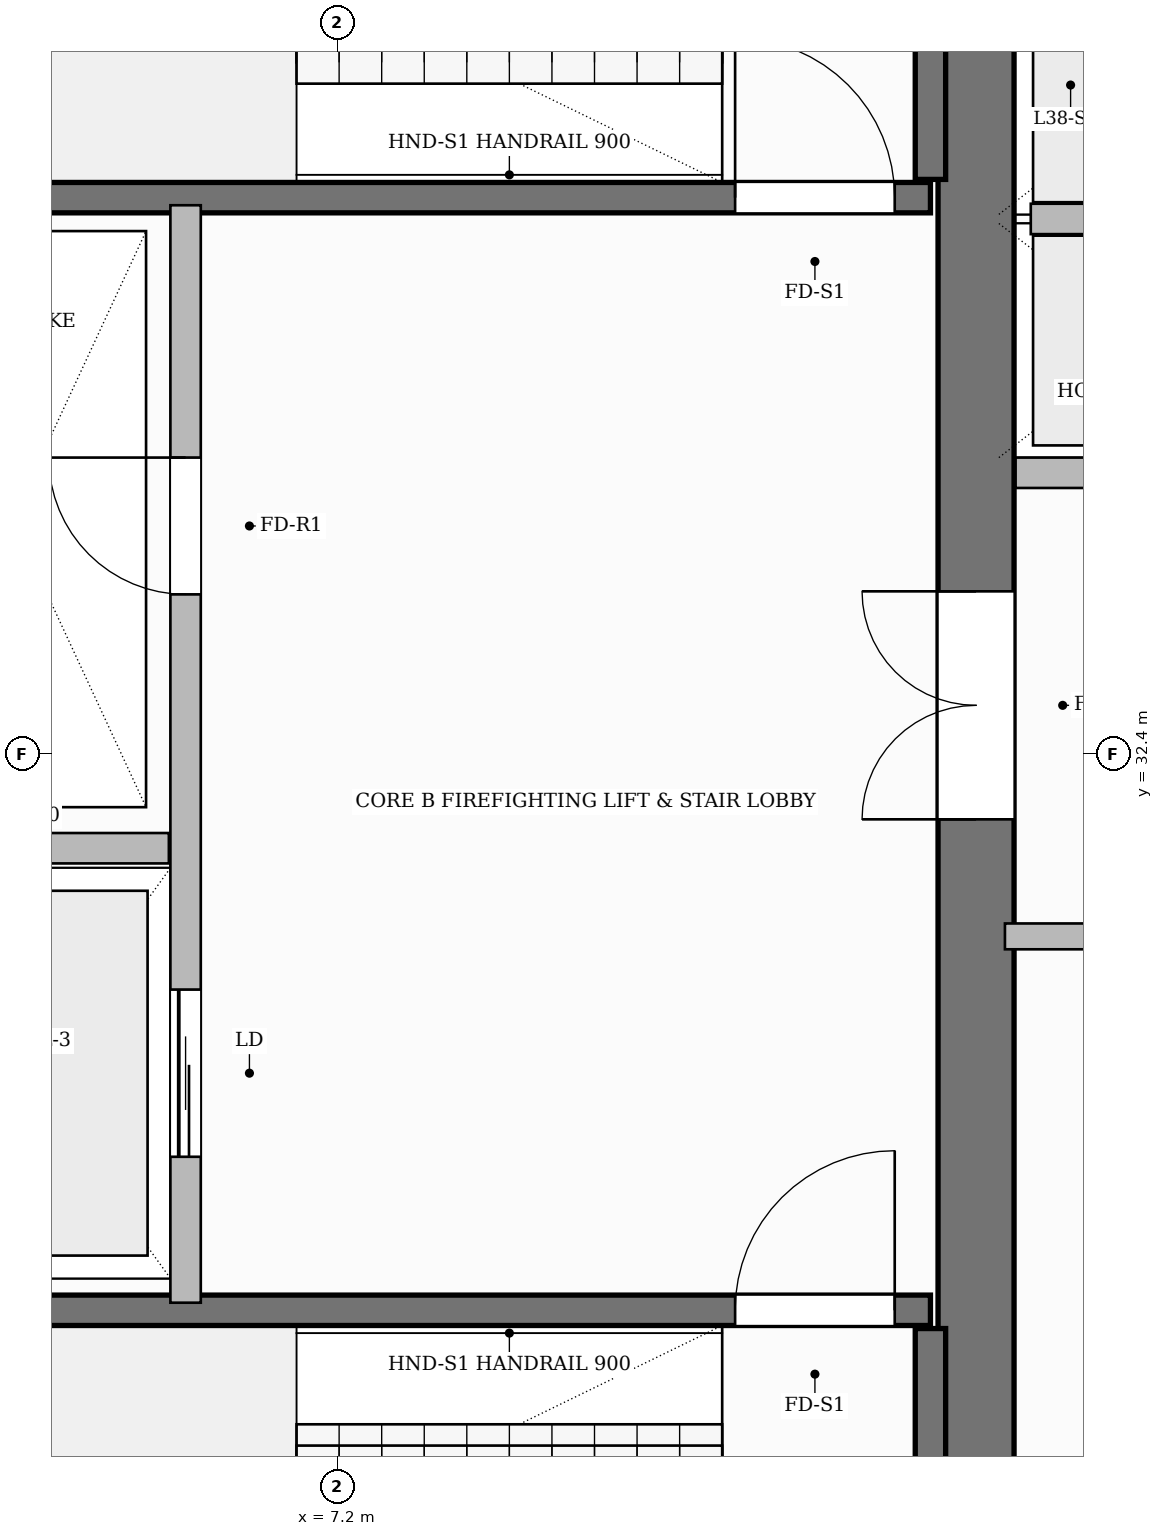
"""IFC4 building model, lengths in metres.
Left out: names, types, materials, properties, quantities, classifications, styles, units other than length and angle.
Written with IfcOpenShell. Run it as: python <this file> out.ifc"""

import sys

from ifc_helpers import new_model, si_unit, direction, frame, frame_2d, origin, place, context, subcontext, project, spatial, rectangle, extrude, source, transform, mapped, element, fill, save


model = new_model("IFC4")
c1 = context("Model", 3, precision=1e-05, world=origin(), true_north=direction((0.0, 1.0)))
c2 = subcontext(c1, "Body", "Model", "MODEL_VIEW")
j1 = project(units=[si_unit("LENGTHUNIT", "METRE"), si_unit("PLANEANGLEUNIT", "RADIAN")], contexts=[c1])
p1 = place(None, origin())
s1 = spatial("IfcSite", under=j1, at=p1, CompositionType="ELEMENT")
p2 = place(p1, origin())
s2 = spatial("IfcBuilding", under=s1, at=p2, CompositionType="ELEMENT")
p3 = place(p2, frame((0.0, 0.0, 111.8)))
s3 = spatial("IfcBuildingStorey", under=s2, at=p3, CompositionType="ELEMENT", Elevation=111.8)
p4 = place(p3, frame((11.4, 25.475, 0.0), z_axis=(0.0, 0.0, 1.0), x_axis=(0.0, 1.0, 0.0)))
e1 = element("IfcWall", 1, at=p4, inside=s3, PredefinedType="SHEAR", context=c2, shape_type="SweptSolid", body=[
    extrude(rectangle(XDim=13.85, YDim=0.55, at=frame_2d((6.925, 0.0))), origin(), (0.0, 0.0, 1.0), 3.7),
])
p5 = place(p4, frame((6.495, 0.0, 0.0)))
e2 = element("IfcOpeningElement", 2, at=p5, cuts=e1, PredefinedType="OPENING", context=c2, shape_type="SweptSolid", body=[
    extrude(rectangle(XDim=1.5, YDim=2.2, at=frame_2d((0.75, 1.1))), frame((0.0, 0.285, 0.0), z_axis=(0.0, -1.0, 0.0), x_axis=(1.0, 0.0, 0.0)), (0.0, 0.0, 1.0), 0.57),
])
p6 = place(p3, frame((11.1, 25.92, 0.0), z_axis=(0.0, 0.0, 1.0), x_axis=(0.0, 1.0, 0.0)))
e3 = element("IfcWall", 3, at=p6, inside=s3, PredefinedType="SHEAR", context=c2, shape_type="SweptSolid", body=[
    extrude(rectangle(XDim=2.7, YDim=0.2, at=frame_2d((1.35, 0.0))), origin(), (0.0, 0.0, 1.0), 3.7),
])
p7 = place(p3, frame((4.0, 28.74, 0.0), z_axis=(0.0, 0.0, 1.0), x_axis=(1.0, 0.0, 0.0)))
e4 = element("IfcWall", 4, at=p7, inside=s3, PredefinedType="SHEAR", context=c2, shape_type="SweptSolid", body=[
    extrude(rectangle(XDim=7.1, YDim=0.2, at=frame_2d((3.55, 0.0))), origin(), (0.0, 0.0, 1.0), 3.7),
])
p8 = place(p7, frame((5.815, 0.0, 0.0)))
e5 = element("IfcOpeningElement", 5, at=p8, cuts=e4, PredefinedType="OPENING", context=c2, shape_type="SweptSolid", body=[
    extrude(rectangle(XDim=1.05, YDim=2.2, at=frame_2d((0.525, 1.1))), frame((0.0, 0.11, 0.0), z_axis=(0.0, -1.0, 0.0), x_axis=(1.0, 0.0, 0.0)), (0.0, 0.0, 1.0), 0.22),
])
p9 = place(p3, frame((11.1, 36.18, 0.0), z_axis=(0.0, 0.0, 1.0), x_axis=(0.0, 1.0, 0.0)))
e6 = element("IfcWall", 6, at=p9, inside=s3, PredefinedType="SHEAR", context=c2, shape_type="SweptSolid", body=[
    extrude(rectangle(XDim=2.7, YDim=0.2, at=frame_2d((1.35, 0.0))), origin(), (0.0, 0.0, 1.0), 3.7),
])
p10 = place(p3, frame((4.0, 36.06, 0.0), z_axis=(0.0, 0.0, 1.0), x_axis=(1.0, 0.0, 0.0)))
e7 = element("IfcWall", 7, at=p10, inside=s3, PredefinedType="SHEAR", context=c2, shape_type="SweptSolid", body=[
    extrude(rectangle(XDim=7.1, YDim=0.2, at=frame_2d((3.55, 0.0))), origin(), (0.0, 0.0, 1.0), 3.7),
])
p11 = place(p10, frame((5.815, 0.0, 0.0)))
e8 = element("IfcOpeningElement", 8, at=p11, cuts=e7, PredefinedType="OPENING", context=c2, shape_type="SweptSolid", body=[
    extrude(rectangle(XDim=1.05, YDim=2.2, at=frame_2d((0.525, 1.1))), frame((0.0, 0.11, 0.0), z_axis=(0.0, -1.0, 0.0), x_axis=(1.0, 0.0, 0.0)), (0.0, 0.0, 1.0), 0.22),
])
p12 = place(p3, frame((6.2, 28.79, 0.0), z_axis=(0.0, 0.0, 1.0), x_axis=(0.0, 1.0, 0.0)))
e9 = element("IfcWall", 9, at=p12, inside=s3, PredefinedType="PARTITIONING", context=c2, shape_type="SweptSolid", body=[
    extrude(rectangle(XDim=7.22, YDim=0.2, at=frame_2d((3.61, 0.0))), origin(), (0.0, 0.0, 1.0), 3.45),
])
p13 = place(p12, frame((4.66, 0.0, 0.0)))
e10 = element("IfcOpeningElement", 10, at=p13, cuts=e9, PredefinedType="OPENING", context=c2, shape_type="SweptSolid", body=[
    extrude(rectangle(XDim=0.9, YDim=2.1, at=frame_2d((0.45, 1.05))), frame((0.0, 0.11, 0.0), z_axis=(0.0, -1.0, 0.0), x_axis=(1.0, 0.0, 0.0)), (0.0, 0.0, 1.0), 0.22),
])
p14 = place(p12, frame((0.96, 0.0, 0.0)))
e11 = element("IfcOpeningElement", 11, at=p14, cuts=e9, PredefinedType="OPENING", context=c2, shape_type="SweptSolid", body=[
    extrude(rectangle(XDim=1.1, YDim=2.2, at=frame_2d((0.55, 1.1))), frame((0.0, 0.11, 0.0), z_axis=(0.0, -1.0, 0.0), x_axis=(1.0, 0.0, 0.0)), (0.0, 0.0, 1.0), 0.22),
])
p15 = place(p3, frame((3.96, 31.78, 0.0), z_axis=(0.0, 0.0, 1.0), x_axis=(1.0, 0.0, 0.0)))
e12 = element("IfcWall", 12, at=p15, inside=s3, PredefinedType="PARTITIONING", context=c2, shape_type="SweptSolid", body=[
    extrude(rectangle(XDim=2.13, YDim=0.2, at=frame_2d((1.065, 0.0))), origin(), (0.0, 0.0, 1.0), 3.45),
])
p16 = place(p3, frame((11.685, 34.25, 0.0), z_axis=(0.0, 0.0, 1.0), x_axis=(1.0, 0.0, 0.0)))
e13 = element("IfcWall", 13, at=p16, inside=s3, PredefinedType="PARTITIONING", context=c2, shape_type="SweptSolid", body=[
    extrude(rectangle(XDim=1.985, YDim=0.2, at=frame_2d((0.992, 0.0))), origin(), (0.0, 0.0, 1.0), 3.45),
])
p17 = place(p3, frame((11.785, 35.92, 0.0), z_axis=(0.0, 0.0, 1.0), x_axis=(1.0, 0.0, 0.0)))
e14 = element("IfcWall", 14, at=p17, inside=s3, PredefinedType="PARTITIONING", context=c2, shape_type="SweptSolid", body=[
    extrude(rectangle(XDim=1.785, YDim=0.2, at=frame_2d((0.893, 0.0))), origin(), (0.0, 0.0, 1.0), 3.45),
])
p18 = place(p3, frame((11.59, 31.2, 0.0), z_axis=(0.0, 0.0, 1.0), x_axis=(1.0, 0.0, 0.0)))
e15 = element("IfcWall", 15, at=p18, inside=s3, PredefinedType="PARTITIONING", context=c2, shape_type="SweptSolid", body=[
    extrude(rectangle(XDim=3.37, YDim=0.17, at=frame_2d((1.685, 0.0))), origin(), (0.0, 0.0, 1.0), 3.45),
])
p19 = place(p18, frame((1.185, 0.0, 0.0)))
e16 = element("IfcOpeningElement", 16, at=p19, cuts=e15, PredefinedType="OPENING", context=c2, shape_type="SweptSolid", body=[
    extrude(rectangle(XDim=0.95, YDim=2.15, at=frame_2d((0.475, 1.075))), frame((0.0, 0.095, 0.0), z_axis=(0.0, -1.0, 0.0), x_axis=(1.0, 0.0, 0.0)), (0.0, 0.0, 1.0), 0.19),
])
m1 = source(origin(), c2, "Body", "SweptSolid", [
    extrude(rectangle(XDim=1.05, YDim=2.2, at=frame_2d((0.525, 1.1))), frame((0.0, 0.025, 0.0), z_axis=(0.0, -1.0, 0.0), x_axis=(1.0, 0.0, 0.0)), (0.0, 0.0, 1.0), 0.05),
])
p20 = place(p8, origin())
e17 = element("IfcDoor", 17, at=p20, inside=s3, OperationType="SINGLE_SWING_RIGHT", PredefinedType="DOOR", context=c2, shape_type="MappedRepresentation", body=[
    mapped(m1, transform((0.0, 0.0, 0.0), scale=1.0)),
])
fill(e5, e17)
p21 = place(p11, origin())
e18 = element("IfcDoor", 18, at=p21, inside=s3, OperationType="SINGLE_SWING_LEFT", PredefinedType="DOOR", context=c2, shape_type="MappedRepresentation", body=[
    mapped(m1, transform((0.0, 0.0, 0.0), scale=1.0)),
])
fill(e8, e18)
m2 = source(origin(), c2, "Body", "SweptSolid", [
    extrude(rectangle(XDim=0.9, YDim=2.1, at=frame_2d((0.45, 1.05))), frame((0.0, 0.025, 0.0), z_axis=(0.0, -1.0, 0.0), x_axis=(1.0, 0.0, 0.0)), (0.0, 0.0, 1.0), 0.05),
])
p22 = place(p13, origin())
e19 = element("IfcDoor", 19, at=p22, inside=s3, OperationType="SINGLE_SWING_RIGHT", PredefinedType="DOOR", context=c2, shape_type="MappedRepresentation", body=[
    mapped(m2, transform((0.0, 0.0, 0.0), scale=1.0)),
])
fill(e10, e19)
m3 = source(origin(), c2, "Body", "SweptSolid", [
    extrude(rectangle(XDim=1.5, YDim=2.2, at=frame_2d((0.75, 1.1))), frame((0.0, 0.025, 0.0), z_axis=(0.0, -1.0, 0.0), x_axis=(1.0, 0.0, 0.0)), (0.0, 0.0, 1.0), 0.05),
])
p23 = place(p5, origin())
e20 = element("IfcDoor", 20, at=p23, inside=s3, OperationType="DOUBLE_DOOR_SINGLE_SWING", PredefinedType="DOOR", context=c2, shape_type="MappedRepresentation", body=[
    mapped(m3, transform((0.0, 0.0, 0.0), scale=1.0)),
])
fill(e2, e20)
m4 = source(origin(), c2, "Body", "SweptSolid", [
    extrude(rectangle(XDim=1.1, YDim=2.2, at=frame_2d((0.55, 1.1))), frame((0.0, 0.025, 0.0), z_axis=(0.0, -1.0, 0.0), x_axis=(1.0, 0.0, 0.0)), (0.0, 0.0, 1.0), 0.05),
])
p24 = place(p14, origin())
e21 = element("IfcDoor", 21, at=p24, inside=s3, OperationType="SLIDING_TO_LEFT", PredefinedType="DOOR", context=c2, shape_type="MappedRepresentation", body=[
    mapped(m4, transform((0.0, 0.0, 0.0), scale=1.0)),
])
fill(e11, e21)
save(model, sys.argv[1])
